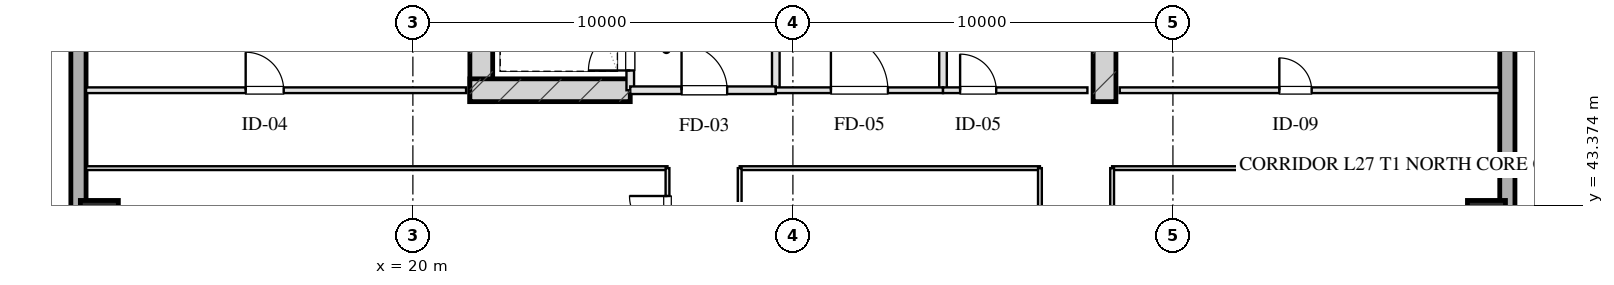
"""IFC4 building model, lengths in metres.
Left out: names, types, materials, properties, quantities, classifications, styles, units other than length and angle.
Written with IfcOpenShell. Run it as: python <this file> out.ifc"""

import sys

from ifc_helpers import new_model, si_unit, direction, frame, frame_2d, origin, origin_2d, place, context, subcontext, project, spatial, rectangle, hollow_rectangle, extrude, element, fill, save


model = new_model("IFC4")
c1 = context("Model", 3, precision=1e-05, world=origin(), true_north=direction((0.0, 1.0)))
c2 = subcontext(c1, "Body", "Model", "MODEL_VIEW")
j1 = project(units=[si_unit("LENGTHUNIT", "METRE"), si_unit("PLANEANGLEUNIT", "RADIAN")], contexts=[c1])
p1 = place(None, origin())
s1 = spatial("IfcSite", under=j1, at=p1, CompositionType="ELEMENT")
p2 = place(p1, origin())
s2 = spatial("IfcBuilding", under=s1, at=p2, CompositionType="ELEMENT")
p3 = place(p2, frame((0.0, 0.0, 106.95)))
s3 = spatial("IfcBuildingStorey", under=s2, at=p3, CompositionType="ELEMENT", Elevation=106.95)
for number, where, z_axis, x_axis in (
    (1, (21.8, 46.1, 0.0), (0.0, 0.0, 1.0), (0.0, 1.0, 0.0)),
    (2, (38.2, 46.1, 0.0), (0.0, 0.0, 1.0), (0.0, 1.0, 0.0)),
):
    element("IfcWall", number, at=place(p3, frame(where, z_axis=z_axis, x_axis=x_axis)), inside=s3, PredefinedType="SHEAR", context=c2, shape_type="SweptSolid", body=[
        extrude(rectangle(XDim=9.48, YDim=0.6, at=frame_2d((4.74, 0.0))), origin(), (0.0, 0.0, 1.0), 3.45),
    ])
p4 = place(p3, frame((21.5, 46.4, 0.0), z_axis=(0.0, 0.0, 1.0), x_axis=(1.0, 0.0, 0.0)))
e3 = element("IfcWall", 3, at=p4, inside=s3, PredefinedType="SHEAR", context=c2, shape_type="SweptSolid", body=[
    extrude(rectangle(XDim=4.22, YDim=0.6, at=frame_2d((2.11, 0.0))), origin(), (0.0, 0.0, 1.0), 3.45),
])
for number, where, z_axis, x_axis in (
    (4, (11.75, 43.0, 0.0), (0.0, 0.0, 1.0), (1.0, 0.0, 0.0)),
    (5, (48.25, 43.0, 0.0), (0.0, 0.0, 1.0), (1.0, 0.0, 0.0)),
):
    element("IfcColumn", number, at=place(p3, frame(where, z_axis=z_axis, x_axis=x_axis)), inside=s3, PredefinedType="COLUMN", context=c2, shape_type="SweptSolid", body=[
        extrude(hollow_rectangle(XDim=1.0, YDim=1.0, WallThickness=0.036, at=origin_2d()), origin(), (0.0, 0.0, 1.0), 3.451),
    ])
p5 = place(p3, frame((11.2, 9.0, 0.0), z_axis=(0.0, 0.0, 1.0), x_axis=(0.0, 1.0, 0.0)))
e6 = element("IfcWall", 6, at=p5, inside=s3, PredefinedType="SOLIDWALL", context=c2, shape_type="SweptSolid", body=[
    extrude(rectangle(XDim=50.0, YDim=0.4, at=frame_2d((25.0, 0.0))), origin(), (0.0, 0.0, 1.0), 2.61),
])
p6 = place(p5, frame((26.4, 0.0, 0.75)))
e7 = element("IfcOpeningElement", 7, at=p6, cuts=e6, PredefinedType="OPENING", context=c2, shape_type="SweptSolid", body=[
    extrude(rectangle(XDim=2.4, YDim=1.46, at=frame_2d((1.2, 0.73))), frame((0.0, 0.21, 0.0), z_axis=(0.0, -1.0, 0.0), x_axis=(1.0, 0.0, 0.0)), (0.0, 0.0, 1.0), 0.42),
])
p7 = place(p3, frame((48.8, 59.0, 0.0), z_axis=(0.0, 0.0, 1.0), x_axis=(0.0, -1.0, 0.0)))
e8 = element("IfcWall", 8, at=p7, inside=s3, PredefinedType="SOLIDWALL", context=c2, shape_type="SweptSolid", body=[
    extrude(rectangle(XDim=50.0, YDim=0.4, at=frame_2d((25.0, 0.0))), origin(), (0.0, 0.0, 1.0), 2.61),
])
p8 = place(p7, frame((30.2, 0.0, 0.75)))
e9 = element("IfcOpeningElement", 9, at=p8, cuts=e8, PredefinedType="OPENING", context=c2, shape_type="SweptSolid", body=[
    extrude(rectangle(XDim=2.4, YDim=1.46, at=frame_2d((1.2, 0.73))), frame((0.0, 0.21, 0.0), z_axis=(0.0, -1.0, 0.0), x_axis=(1.0, 0.0, 0.0)), (0.0, 0.0, 1.0), 0.42),
])
p9 = place(p7, frame((17.4, 0.0, 0.75)))
e10 = element("IfcOpeningElement", 10, at=p9, cuts=e8, PredefinedType="OPENING", context=c2, shape_type="SweptSolid", body=[
    extrude(rectangle(XDim=2.4, YDim=1.46, at=frame_2d((1.2, 0.73))), frame((0.0, 0.21, 0.0), z_axis=(0.0, -1.0, 0.0), x_axis=(1.0, 0.0, 0.0)), (0.0, 0.0, 1.0), 0.42),
])
p10 = place(p3, frame((25.72, 46.4, 0.0), z_axis=(0.0, 0.0, 1.0), x_axis=(0.0, 1.0, 0.0)))
e11 = element("IfcWall", 11, at=p10, inside=s3, PredefinedType="PARTITIONING", context=c2, shape_type="SweptSolid", body=[
    extrude(rectangle(XDim=1.9, YDim=0.2, at=frame_2d((0.95, 0.0))), origin(), (0.0, 0.0, 1.0), 3.175),
])
p11 = place(p10, frame((0.52, 0.0, 0.0)))
e12 = element("IfcOpeningElement", 12, at=p11, cuts=e11, PredefinedType="OPENING", context=c2, shape_type="SweptSolid", body=[
    extrude(rectangle(XDim=1.1, YDim=2.05, at=frame_2d((0.55, 1.025))), frame((0.0, 0.11, 0.0), z_axis=(0.0, -1.0, 0.0), x_axis=(1.0, 0.0, 0.0)), (0.0, 0.0, 1.0), 0.22),
])
p12 = place(p3, frame((29.55, 46.4, 0.0), z_axis=(0.0, 0.0, 1.0), x_axis=(0.0, 1.0, 0.0)))
e13 = element("IfcWall", 13, at=p12, inside=s3, PredefinedType="PARTITIONING", context=c2, shape_type="SweptSolid", body=[
    extrude(rectangle(XDim=8.43, YDim=0.2, at=frame_2d((4.215, 0.0))), origin(), (0.0, 0.0, 1.0), 3.175),
])
p13 = place(p3, frame((25.72, 46.4, 0.0), z_axis=(0.0, 0.0, 1.0), x_axis=(1.0, 0.0, 0.0)))
e14 = element("IfcWall", 14, at=p13, inside=s3, PredefinedType="PARTITIONING", context=c2, shape_type="SweptSolid", body=[
    extrude(rectangle(XDim=3.83, YDim=0.2, at=frame_2d((1.915, 0.0))), origin(), (0.0, 0.0, 1.0), 3.175),
])
p14 = place(p13, frame((1.35, 0.0, 0.0)))
e15 = element("IfcOpeningElement", 15, at=p14, cuts=e14, PredefinedType="OPENING", context=c2, shape_type="SweptSolid", body=[
    extrude(rectangle(XDim=1.2, YDim=2.05, at=frame_2d((0.6, 1.025))), frame((0.0, 0.11, 0.0), z_axis=(0.0, -1.0, 0.0), x_axis=(1.0, 0.0, 0.0)), (0.0, 0.0, 1.0), 0.22),
])
p15 = place(p3, frame((33.95, 46.4, 0.0), z_axis=(0.0, 0.0, 1.0), x_axis=(0.0, 1.0, 0.0)))
e16 = element("IfcWall", 16, at=p15, inside=s3, PredefinedType="PARTITIONING", context=c2, shape_type="SweptSolid", body=[
    extrude(rectangle(XDim=8.43, YDim=0.2, at=frame_2d((4.215, 0.0))), origin(), (0.0, 0.0, 1.0), 3.175),
])
p16 = place(p3, frame((29.55, 46.4, 0.0), z_axis=(0.0, 0.0, 1.0), x_axis=(1.0, 0.0, 0.0)))
e17 = element("IfcWall", 17, at=p16, inside=s3, PredefinedType="PARTITIONING", context=c2, shape_type="SweptSolid", body=[
    extrude(rectangle(XDim=4.4, YDim=0.15, at=frame_2d((2.2, 0.0))), origin(), (0.0, 0.0, 1.0), 3.175),
])
p17 = place(p16, frame((1.45, 0.0, 0.0)))
e18 = element("IfcOpeningElement", 18, at=p17, cuts=e17, PredefinedType="OPENING", context=c2, shape_type="SweptSolid", body=[
    extrude(rectangle(XDim=1.5, YDim=2.05, at=frame_2d((0.75, 1.025))), frame((0.0, 0.085, 0.0), z_axis=(0.0, -1.0, 0.0), x_axis=(1.0, 0.0, 0.0)), (0.0, 0.0, 1.0), 0.17),
])
p18 = place(p3, frame((33.95, 46.4, 0.0), z_axis=(0.0, 0.0, 1.0), x_axis=(1.0, 0.0, 0.0)))
e19 = element("IfcWall", 19, at=p18, inside=s3, PredefinedType="PARTITIONING", context=c2, shape_type="SweptSolid", body=[
    extrude(rectangle(XDim=3.8, YDim=0.15, at=frame_2d((1.9, 0.0))), origin(), (0.0, 0.0, 1.0), 3.175),
])
p19 = place(p18, frame((0.45, 0.0, 0.0)))
e20 = element("IfcOpeningElement", 20, at=p19, cuts=e19, PredefinedType="OPENING", context=c2, shape_type="SweptSolid", body=[
    extrude(rectangle(XDim=0.95, YDim=2.05, at=frame_2d((0.475, 1.025))), frame((0.0, 0.085, 0.0), z_axis=(0.0, -1.0, 0.0), x_axis=(1.0, 0.0, 0.0)), (0.0, 0.0, 1.0), 0.17),
])
p20 = place(p3, frame((11.4, 46.4, 0.0), z_axis=(0.0, 0.0, 1.0), x_axis=(1.0, 0.0, 0.0)))
e21 = element("IfcWall", 21, at=p20, inside=s3, PredefinedType="PARTITIONING", context=c2, shape_type="SweptSolid", body=[
    extrude(rectangle(XDim=10.0, YDim=0.15, at=frame_2d((5.0, 0.0))), origin(), (0.0, 0.0, 1.0), 3.175),
])
p21 = place(p20, frame((4.2, 0.0, 0.0)))
e22 = element("IfcOpeningElement", 22, at=p21, cuts=e21, PredefinedType="OPENING", context=c2, shape_type="SweptSolid", body=[
    extrude(rectangle(XDim=1.0, YDim=2.05, at=frame_2d((0.5, 1.025))), frame((0.0, 0.085, 0.0), z_axis=(0.0, -1.0, 0.0), x_axis=(1.0, 0.0, 0.0)), (0.0, 0.0, 1.0), 0.17),
])
p22 = place(p3, frame((38.6, 46.4, 0.0), z_axis=(0.0, 0.0, 1.0), x_axis=(1.0, 0.0, 0.0)))
e23 = element("IfcWall", 23, at=p22, inside=s3, PredefinedType="PARTITIONING", context=c2, shape_type="SweptSolid", body=[
    extrude(rectangle(XDim=10.0, YDim=0.15, at=frame_2d((5.0, 0.0))), origin(), (0.0, 0.0, 1.0), 3.175),
])
p23 = place(p22, frame((4.2, 0.0, 0.0)))
e24 = element("IfcOpeningElement", 24, at=p23, cuts=e23, PredefinedType="OPENING", context=c2, shape_type="SweptSolid", body=[
    extrude(rectangle(XDim=0.85, YDim=2.05, at=frame_2d((0.425, 1.025))), frame((0.0, 0.085, 0.0), z_axis=(0.0, -1.0, 0.0), x_axis=(1.0, 0.0, 0.0)), (0.0, 0.0, 1.0), 0.17),
])
p24 = place(p3, frame((11.4, 44.35, 0.0), z_axis=(0.0, 0.0, 1.0), x_axis=(1.0, 0.0, 0.0)))
e25 = element("IfcWall", 25, at=p24, inside=s3, PredefinedType="MOVABLE", context=c2, shape_type="SweptSolid", body=[
    extrude(rectangle(XDim=15.3, YDim=0.1, at=frame_2d((7.65, 0.0))), origin(), (0.0, 0.0, 1.0), 3.175),
])
p25 = place(p3, frame((28.6, 44.35, 0.0), z_axis=(0.0, 0.0, 1.0), x_axis=(1.0, 0.0, 0.0)))
e26 = element("IfcWall", 26, at=p25, inside=s3, PredefinedType="MOVABLE", context=c2, shape_type="SweptSolid", body=[
    extrude(rectangle(XDim=7.9, YDim=0.1, at=frame_2d((3.95, 0.0))), origin(), (0.0, 0.0, 1.0), 3.175),
])
p26 = place(p3, frame((38.4, 44.35, 0.0), z_axis=(0.0, 0.0, 1.0), x_axis=(1.0, 0.0, 0.0)))
e27 = element("IfcWall", 27, at=p26, inside=s3, PredefinedType="MOVABLE", context=c2, shape_type="SweptSolid", body=[
    extrude(rectangle(XDim=10.2, YDim=0.1, at=frame_2d((5.1, 0.0))), origin(), (0.0, 0.0, 1.0), 3.175),
])
p27 = place(p3, frame((26.7, 23.65, 0.0), z_axis=(0.0, 0.0, 1.0), x_axis=(0.0, 1.0, 0.0)))
e28 = element("IfcWall", 28, at=p27, inside=s3, PredefinedType="MOVABLE", context=c2, shape_type="SweptSolid", body=[
    extrude(rectangle(XDim=20.7, YDim=0.1, at=frame_2d((10.35, 0.0))), origin(), (0.0, 0.0, 1.0), 3.175),
])
p28 = place(p27, frame((0.775, 0.0, 0.0)))
e29 = element("IfcOpeningElement", 29, at=p28, cuts=e28, PredefinedType="OPENING", context=c2, shape_type="SweptSolid", body=[
    extrude(rectangle(XDim=1.0, YDim=2.05, at=frame_2d((0.5, 1.025))), frame((0.0, 0.06, 0.0), z_axis=(0.0, -1.0, 0.0), x_axis=(1.0, 0.0, 0.0)), (0.0, 0.0, 1.0), 0.12),
])
p29 = place(p27, frame((3.95, 0.0, 0.0)))
e30 = element("IfcOpeningElement", 30, at=p29, cuts=e28, PredefinedType="OPENING", context=c2, shape_type="SweptSolid", body=[
    extrude(rectangle(XDim=1.05, YDim=2.05, at=frame_2d((0.525, 1.025))), frame((0.0, 0.06, 0.0), z_axis=(0.0, -1.0, 0.0), x_axis=(1.0, 0.0, 0.0)), (0.0, 0.0, 1.0), 0.12),
])
p30 = place(p27, frame((8.273, 0.0, 0.0)))
e31 = element("IfcOpeningElement", 31, at=p30, cuts=e28, PredefinedType="OPENING", context=c2, shape_type="SweptSolid", body=[
    extrude(rectangle(XDim=1.0, YDim=2.05, at=frame_2d((0.5, 1.025))), frame((0.0, 0.06, 0.0), z_axis=(0.0, -1.0, 0.0), x_axis=(1.0, 0.0, 0.0)), (0.0, 0.0, 1.0), 0.12),
])
p31 = place(p27, frame((12.559, 0.0, 0.0)))
e32 = element("IfcOpeningElement", 32, at=p31, cuts=e28, PredefinedType="OPENING", context=c2, shape_type="SweptSolid", body=[
    extrude(rectangle(XDim=1.0, YDim=2.05, at=frame_2d((0.5, 1.025))), frame((0.0, 0.06, 0.0), z_axis=(0.0, -1.0, 0.0), x_axis=(1.0, 0.0, 0.0)), (0.0, 0.0, 1.0), 0.12),
])
p32 = place(p27, frame((16.078, 0.0, 0.0)))
e33 = element("IfcOpeningElement", 33, at=p32, cuts=e28, PredefinedType="OPENING", context=c2, shape_type="SweptSolid", body=[
    extrude(rectangle(XDim=1.0, YDim=2.05, at=frame_2d((0.5, 1.025))), frame((0.0, 0.06, 0.0), z_axis=(0.0, -1.0, 0.0), x_axis=(1.0, 0.0, 0.0)), (0.0, 0.0, 1.0), 0.12),
])
p33 = place(p27, frame((18.967, 0.0, 0.0)))
e34 = element("IfcOpeningElement", 34, at=p33, cuts=e28, PredefinedType="OPENING", context=c2, shape_type="SweptSolid", body=[
    extrude(rectangle(XDim=1.0, YDim=2.05, at=frame_2d((0.5, 1.025))), frame((0.0, 0.06, 0.0), z_axis=(0.0, -1.0, 0.0), x_axis=(1.0, 0.0, 0.0)), (0.0, 0.0, 1.0), 0.12),
])
p34 = place(p3, frame((28.6, 23.65, 0.0), z_axis=(0.0, 0.0, 1.0), x_axis=(0.0, 1.0, 0.0)))
e35 = element("IfcWall", 35, at=p34, inside=s3, PredefinedType="MOVABLE", context=c2, shape_type="SweptSolid", body=[
    extrude(rectangle(XDim=20.7, YDim=0.1, at=frame_2d((10.35, 0.0))), origin(), (0.0, 0.0, 1.0), 3.175),
])
p35 = place(p34, frame((5.198, 0.0, 0.0)))
e36 = element("IfcOpeningElement", 36, at=p35, cuts=e35, PredefinedType="OPENING", context=c2, shape_type="SweptSolid", body=[
    extrude(rectangle(XDim=1.1, YDim=2.05, at=frame_2d((0.55, 1.025))), frame((0.0, 0.06, 0.0), z_axis=(0.0, -1.0, 0.0), x_axis=(1.0, 0.0, 0.0)), (0.0, 0.0, 1.0), 0.12),
])
p36 = place(p34, frame((15.667, 0.0, 0.0)))
e37 = element("IfcOpeningElement", 37, at=p36, cuts=e35, PredefinedType="OPENING", context=c2, shape_type="SweptSolid", body=[
    extrude(rectangle(XDim=1.1, YDim=2.05, at=frame_2d((0.55, 1.025))), frame((0.0, 0.06, 0.0), z_axis=(0.0, -1.0, 0.0), x_axis=(1.0, 0.0, 0.0)), (0.0, 0.0, 1.0), 0.12),
])
p37 = place(p3, frame((36.5, 23.65, 0.0), z_axis=(0.0, 0.0, 1.0), x_axis=(0.0, 1.0, 0.0)))
e38 = element("IfcWall", 38, at=p37, inside=s3, PredefinedType="MOVABLE", context=c2, shape_type="SweptSolid", body=[
    extrude(rectangle(XDim=20.7, YDim=0.1, at=frame_2d((10.35, 0.0))), origin(), (0.0, 0.0, 1.0), 3.175),
])
p38 = place(p3, frame((38.4, 23.65, 0.0), z_axis=(0.0, 0.0, 1.0), x_axis=(0.0, 1.0, 0.0)))
e39 = element("IfcWall", 39, at=p38, inside=s3, PredefinedType="MOVABLE", context=c2, shape_type="SweptSolid", body=[
    extrude(rectangle(XDim=20.7, YDim=0.1, at=frame_2d((10.35, 0.0))), origin(), (0.0, 0.0, 1.0), 3.175),
])
p39 = place(p38, frame((2.699, 0.0, 0.0)))
e40 = element("IfcOpeningElement", 40, at=p39, cuts=e39, PredefinedType="OPENING", context=c2, shape_type="SweptSolid", body=[
    extrude(rectangle(XDim=1.05, YDim=2.05, at=frame_2d((0.525, 1.025))), frame((0.0, 0.06, 0.0), z_axis=(0.0, -1.0, 0.0), x_axis=(1.0, 0.0, 0.0)), (0.0, 0.0, 1.0), 0.12),
])
p40 = place(p38, frame((9.875, 0.0, 0.0)))
e41 = element("IfcOpeningElement", 41, at=p40, cuts=e39, PredefinedType="OPENING", context=c2, shape_type="SweptSolid", body=[
    extrude(rectangle(XDim=1.0, YDim=2.05, at=frame_2d((0.5, 1.025))), frame((0.0, 0.06, 0.0), z_axis=(0.0, -1.0, 0.0), x_axis=(1.0, 0.0, 0.0)), (0.0, 0.0, 1.0), 0.12),
])
p41 = place(p38, frame((17.025, 0.0, 0.0)))
e42 = element("IfcOpeningElement", 42, at=p41, cuts=e39, PredefinedType="OPENING", context=c2, shape_type="SweptSolid", body=[
    extrude(rectangle(XDim=0.85, YDim=2.05, at=frame_2d((0.425, 1.025))), frame((0.0, 0.06, 0.0), z_axis=(0.0, -1.0, 0.0), x_axis=(1.0, 0.0, 0.0)), (0.0, 0.0, 1.0), 0.12),
])
p42 = place(p11, origin())
e43 = element("IfcDoor", 43, at=p42, inside=s3, OperationType="SINGLE_SWING_LEFT", PredefinedType="DOOR", context=c2, shape_type="SweptSolid", body=[
    extrude(rectangle(XDim=1.1, YDim=2.05, at=frame_2d((0.55, 1.025))), frame((0.0, 0.025, 0.0), z_axis=(0.0, -1.0, 0.0), x_axis=(1.0, 0.0, 0.0)), (0.0, 0.0, 1.0), 0.05),
])
fill(e12, e43)
p43 = place(p14, origin())
e44 = element("IfcDoor", 44, at=p43, inside=s3, OperationType="SINGLE_SWING_LEFT", PredefinedType="DOOR", context=c2, shape_type="SweptSolid", body=[
    extrude(rectangle(XDim=1.2, YDim=2.05, at=frame_2d((0.6, 1.025))), frame((0.0, 0.025, 0.0), z_axis=(0.0, -1.0, 0.0), x_axis=(1.0, 0.0, 0.0)), (0.0, 0.0, 1.0), 0.05),
])
fill(e15, e44)
p44 = place(p17, origin())
e45 = element("IfcDoor", 45, at=p44, inside=s3, OperationType="SINGLE_SWING_LEFT", PredefinedType="DOOR", context=c2, shape_type="SweptSolid", body=[
    extrude(rectangle(XDim=1.5, YDim=2.05, at=frame_2d((0.75, 1.025))), frame((0.0, 0.025, 0.0), z_axis=(0.0, -1.0, 0.0), x_axis=(1.0, 0.0, 0.0)), (0.0, 0.0, 1.0), 0.05),
])
fill(e18, e45)
p45 = place(p19, origin())
e46 = element("IfcDoor", 46, at=p45, inside=s3, OperationType="SINGLE_SWING_LEFT", PredefinedType="DOOR", context=c2, shape_type="SweptSolid", body=[
    extrude(rectangle(XDim=0.95, YDim=2.05, at=frame_2d((0.475, 1.025))), frame((0.0, 0.025, 0.0), z_axis=(0.0, -1.0, 0.0), x_axis=(1.0, 0.0, 0.0)), (0.0, 0.0, 1.0), 0.05),
])
fill(e20, e46)
p46 = place(p21, origin())
e47 = element("IfcDoor", 47, at=p46, inside=s3, OperationType="SINGLE_SWING_LEFT", PredefinedType="DOOR", context=c2, shape_type="SweptSolid", body=[
    extrude(rectangle(XDim=1.0, YDim=2.05, at=frame_2d((0.5, 1.025))), frame((0.0, 0.025, 0.0), z_axis=(0.0, -1.0, 0.0), x_axis=(1.0, 0.0, 0.0)), (0.0, 0.0, 1.0), 0.05),
])
fill(e22, e47)
p47 = place(p23, origin())
e48 = element("IfcDoor", 48, at=p47, inside=s3, OperationType="SINGLE_SWING_LEFT", PredefinedType="DOOR", context=c2, shape_type="SweptSolid", body=[
    extrude(rectangle(XDim=0.85, YDim=2.05, at=frame_2d((0.425, 1.025))), frame((0.0, 0.025, 0.0), z_axis=(0.0, -1.0, 0.0), x_axis=(1.0, 0.0, 0.0)), (0.0, 0.0, 1.0), 0.05),
])
fill(e24, e48)
p48 = place(p33, origin())
e49 = element("IfcDoor", 49, at=p48, inside=s3, OperationType="SINGLE_SWING_RIGHT", PredefinedType="DOOR", context=c2, shape_type="SweptSolid", body=[
    extrude(rectangle(XDim=1.0, YDim=2.05, at=frame_2d((0.5, 1.025))), frame((0.0, 0.025, 0.0), z_axis=(0.0, -1.0, 0.0), x_axis=(1.0, 0.0, 0.0)), (0.0, 0.0, 1.0), 0.05),
])
fill(e34, e49)
save(model, sys.argv[1])
